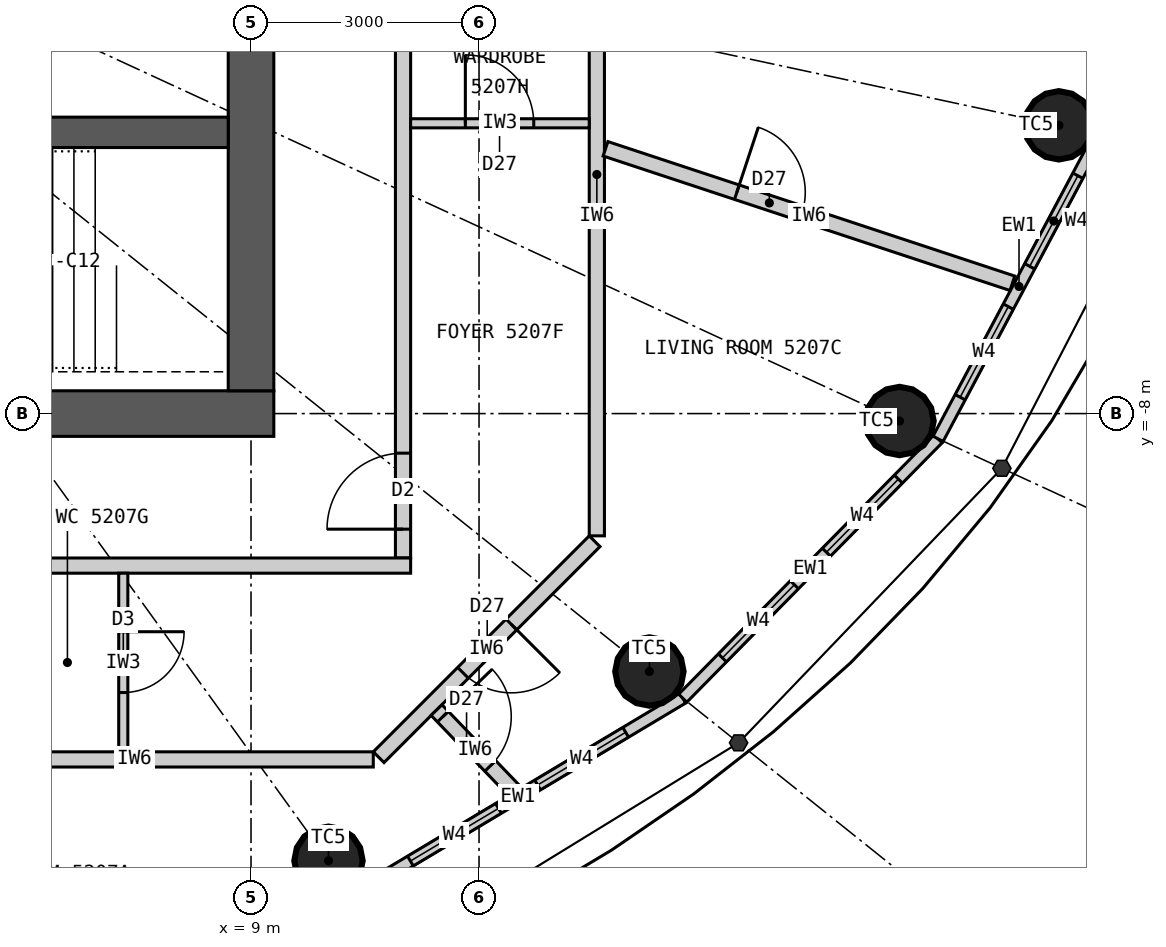
"""IFC4 building model, lengths in metres.
Left out: names, types, materials, properties, quantities, classifications, styles, units other than length and angle.
Written with IfcOpenShell. Run it as: python <this file> out.ifc"""

import sys

from ifc_helpers import new_model, si_unit, direction, frame, frame_2d, origin, origin_2d, place, context, subcontext, project, spatial, rectangle, circle, extrude, element, fill, save


model = new_model("IFC4")
c1 = context("Model", 3, precision=1e-05, world=origin(), true_north=direction((0.0, 1.0)))
c2 = subcontext(c1, "Body", "Model", "MODEL_VIEW")
j1 = project(units=[si_unit("LENGTHUNIT", "METRE"), si_unit("PLANEANGLEUNIT", "RADIAN")], contexts=[c1])
p1 = place(None, origin())
s1 = spatial("IfcSite", under=j1, at=p1, CompositionType="ELEMENT")
p2 = place(p1, origin())
s2 = spatial("IfcBuilding", under=s1, at=p2, CompositionType="ELEMENT")
p3 = place(p2, frame((0.0, 0.0, 196.2)))
s3 = spatial("IfcBuildingStorey", under=s2, at=p3, CompositionType="ELEMENT", Elevation=196.2)
for number, where, z_axis, x_axis in (
    (1, (10.019, -13.883, 0.0), (0.0, 0.0, 1.0), (1.0, 0.0, 0.0)),
    (2, (14.241, -11.393, 0.0), (0.0, 0.0, 1.0), (1.0, 0.0, 0.0)),
    (3, (17.532, -8.098, 0.0), (0.0, 0.0, 1.0), (1.0, 0.0, 0.0)),
    (4, (19.629, -4.208, 0.0), (0.0, 0.0, 1.0), (1.0, 0.0, 0.0)),
):
    element("IfcColumn", number, at=place(p3, frame(where, z_axis=z_axis, x_axis=x_axis)), inside=s3, PredefinedType="COLUMN", context=c2, shape_type="SweptSolid", body=[
        extrude(circle(Radius=0.45, at=origin_2d()), origin(), (0.0, 0.0, 1.0), 3.3),
    ])
p4 = place(p3, frame((9.3, -8.0, 0.0), z_axis=(0.0, 0.0, 1.0), x_axis=(-1.0, 0.0, 0.0)))
e5 = element("IfcWall", 5, at=p4, inside=s3, PredefinedType="SHEAR", context=c2, shape_type="SweptSolid", body=[
    extrude(rectangle(XDim=18.6, YDim=0.6, at=frame_2d((9.3, 0.0))), origin(), (0.0, 0.0, 1.0), 3.3),
])
p5 = place(p4, frame((8.0, 0.0, 0.0)))
e6 = element("IfcOpeningElement", 6, at=p5, cuts=e5, PredefinedType="OPENING", context=c2, shape_type="SweptSolid", body=[
    extrude(rectangle(XDim=1.2, YDim=2.2, at=frame_2d((0.6, 1.1))), frame((0.0, 0.31, 0.0), z_axis=(0.0, -1.0, 0.0), x_axis=(1.0, 0.0, 0.0)), (0.0, 0.0, 1.0), 0.62),
])
p6 = place(p4, frame((15.6, 0.0, 0.0)))
e7 = element("IfcOpeningElement", 7, at=p6, cuts=e5, PredefinedType="OPENING", context=c2, shape_type="SweptSolid", body=[
    extrude(rectangle(XDim=0.9, YDim=2.2, at=frame_2d((0.45, 1.1))), frame((0.0, 0.31, 0.0), z_axis=(0.0, -1.0, 0.0), x_axis=(1.0, 0.0, 0.0)), (0.0, 0.0, 1.0), 0.62),
])
p7 = place(p3, frame((9.0, -7.7, 0.0), z_axis=(0.0, 0.0, 1.0), x_axis=(0.0, 1.0, 0.0)))
e8 = element("IfcWall", 8, at=p7, inside=s3, PredefinedType="SHEAR", context=c2, shape_type="SweptSolid", body=[
    extrude(rectangle(XDim=15.4, YDim=0.6, at=frame_2d((7.7, 0.0))), origin(), (0.0, 0.0, 1.0), 3.3),
])
p8 = place(p7, frame((6.8, 0.0, 0.0)))
e9 = element("IfcOpeningElement", 9, at=p8, cuts=e8, PredefinedType="OPENING", context=c2, shape_type="SweptSolid", body=[
    extrude(rectangle(XDim=1.8, YDim=2.2, at=frame_2d((0.9, 1.1))), frame((0.0, 0.31, 0.0), z_axis=(0.0, -1.0, 0.0), x_axis=(1.0, 0.0, 0.0)), (0.0, 0.0, 1.0), 0.62),
])
p9 = place(p3, frame((-8.7, -4.3, 0.0), z_axis=(0.0, 0.0, 1.0), x_axis=(1.0, 0.0, 0.0)))
e10 = element("IfcWall", 10, at=p9, inside=s3, PredefinedType="SHEAR", context=c2, shape_type="SweptSolid", body=[
    extrude(rectangle(XDim=17.4, YDim=0.4, at=frame_2d((8.7, 0.0))), origin(), (0.0, 0.0, 1.0), 3.3),
])
p10 = place(p3, frame((10.346, -14.336, 0.0), z_axis=(0.0, 0.0, 1.0), x_axis=(0.85822150553, 0.513279502265, 0.0)))
e11 = element("IfcWall", 11, at=p10, inside=s3, PredefinedType="ELEMENTEDWALL", context=c2, shape_type="SweptSolid", body=[
    extrude(rectangle(XDim=5.05, YDim=0.15, at=frame_2d((2.525, 0.0))), origin(), (0.0, 0.0, 1.0), 3.12),
])
p11 = place(p10, frame((0.875, 0.0, 0.9)))
e12 = element("IfcOpeningElement", 12, at=p11, cuts=e11, PredefinedType="OPENING", context=c2, shape_type="SweptSolid", body=[
    extrude(rectangle(XDim=1.35, YDim=1.9, at=frame_2d((0.675, 0.95))), frame((0.0, 0.085, 0.0), z_axis=(0.0, -1.0, 0.0), x_axis=(1.0, 0.0, 0.0)), (0.0, 0.0, 1.0), 0.17),
])
p12 = place(p10, frame((2.825, 0.0, 0.9)))
e13 = element("IfcOpeningElement", 13, at=p12, cuts=e11, PredefinedType="OPENING", context=c2, shape_type="SweptSolid", body=[
    extrude(rectangle(XDim=1.35, YDim=1.9, at=frame_2d((0.675, 0.95))), frame((0.0, 0.085, 0.0), z_axis=(0.0, -1.0, 0.0), x_axis=(1.0, 0.0, 0.0)), (0.0, 0.0, 1.0), 0.17),
])
p13 = place(p3, frame((14.68, -11.744, 0.0), z_axis=(0.0, 0.0, 1.0), x_axis=(0.701527379618, 0.712642501993, 0.0)))
e14 = element("IfcWall", 14, at=p13, inside=s3, PredefinedType="ELEMENTEDWALL", context=c2, shape_type="SweptSolid", body=[
    extrude(rectangle(XDim=4.788, YDim=0.15, at=frame_2d((2.394, 0.0))), origin(), (0.0, 0.0, 1.0), 3.12),
])
p14 = place(p13, frame((0.744, 0.0, 0.9)))
e15 = element("IfcOpeningElement", 15, at=p14, cuts=e14, PredefinedType="OPENING", context=c2, shape_type="SweptSolid", body=[
    extrude(rectangle(XDim=1.35, YDim=1.9, at=frame_2d((0.675, 0.95))), frame((0.0, 0.085, 0.0), z_axis=(0.0, -1.0, 0.0), x_axis=(1.0, 0.0, 0.0)), (0.0, 0.0, 1.0), 0.17),
])
p15 = place(p13, frame((2.694, 0.0, 0.9)))
e16 = element("IfcOpeningElement", 16, at=p15, cuts=e14, PredefinedType="OPENING", context=c2, shape_type="SweptSolid", body=[
    extrude(rectangle(XDim=1.35, YDim=1.9, at=frame_2d((0.675, 0.95))), frame((0.0, 0.085, 0.0), z_axis=(0.0, -1.0, 0.0), x_axis=(1.0, 0.0, 0.0)), (0.0, 0.0, 1.0), 0.17),
])
p16 = place(p3, frame((18.04, -8.332, 0.0), z_axis=(0.0, 0.0, 1.0), x_axis=(0.469256152955, 0.883062094597, 0.0)))
e17 = element("IfcWall", 17, at=p16, inside=s3, PredefinedType="ELEMENTEDWALL", context=c2, shape_type="SweptSolid", body=[
    extrude(rectangle(XDim=4.539, YDim=0.15, at=frame_2d((2.27, 0.0))), origin(), (0.0, 0.0, 1.0), 3.12),
])
p17 = place(p16, frame((0.62, 0.0, 0.9)))
e18 = element("IfcOpeningElement", 18, at=p17, cuts=e17, PredefinedType="OPENING", context=c2, shape_type="SweptSolid", body=[
    extrude(rectangle(XDim=1.35, YDim=1.9, at=frame_2d((0.675, 0.95))), frame((0.0, 0.085, 0.0), z_axis=(0.0, -1.0, 0.0), x_axis=(1.0, 0.0, 0.0)), (0.0, 0.0, 1.0), 0.17),
])
p18 = place(p16, frame((2.57, 0.0, 0.9)))
e19 = element("IfcOpeningElement", 19, at=p18, cuts=e17, PredefinedType="OPENING", context=c2, shape_type="SweptSolid", body=[
    extrude(rectangle(XDim=1.35, YDim=1.9, at=frame_2d((0.675, 0.95))), frame((0.0, 0.085, 0.0), z_axis=(0.0, -1.0, 0.0), x_axis=(1.0, 0.0, 0.0)), (0.0, 0.0, 1.0), 0.17),
])
p19 = place(p3, frame((11.0, -9.9, 0.0), z_axis=(0.0, 0.0, 1.0), x_axis=(0.0, 1.0, 0.0)))
e20 = element("IfcWall", 20, at=p19, inside=s3, PredefinedType="PARTITIONING", context=c2, shape_type="SweptSolid", body=[
    extrude(rectangle(XDim=19.8, YDim=0.2, at=frame_2d((9.9, 0.0))), origin(), (0.0, 0.0, 1.0), 3.12),
])
p20 = place(p19, frame((10.32, 0.0, 0.0)))
e21 = element("IfcOpeningElement", 21, at=p20, cuts=e20, PredefinedType="OPENING", context=c2, shape_type="SweptSolid", body=[
    extrude(rectangle(XDim=1.0, YDim=2.2, at=frame_2d((0.5, 1.1))), frame((0.0, 0.11, 0.0), z_axis=(0.0, -1.0, 0.0), x_axis=(1.0, 0.0, 0.0)), (0.0, 0.0, 1.0), 0.22),
])
p21 = place(p19, frame((18.653, 0.0, 0.0)))
e22 = element("IfcOpeningElement", 22, at=p21, cuts=e20, PredefinedType="OPENING", context=c2, shape_type="SweptSolid", body=[
    extrude(rectangle(XDim=1.0, YDim=2.2, at=frame_2d((0.5, 1.1))), frame((0.0, 0.11, 0.0), z_axis=(0.0, -1.0, 0.0), x_axis=(1.0, 0.0, 0.0)), (0.0, 0.0, 1.0), 0.22),
])
p22 = place(p19, frame((0.379, 0.0, 0.0)))
e23 = element("IfcOpeningElement", 23, at=p22, cuts=e20, PredefinedType="OPENING", context=c2, shape_type="SweptSolid", body=[
    extrude(rectangle(XDim=1.0, YDim=2.2, at=frame_2d((0.5, 1.1))), frame((0.0, 0.11, 0.0), z_axis=(0.0, -1.0, 0.0), x_axis=(1.0, 0.0, 0.0)), (0.0, 0.0, 1.0), 0.22),
])
p23 = place(p3, frame((11.1, -10.0, 0.0), z_axis=(0.0, 0.0, 1.0), x_axis=(-1.0, 0.0, 0.0)))
e24 = element("IfcWall", 24, at=p23, inside=s3, PredefinedType="PARTITIONING", context=c2, shape_type="SweptSolid", body=[
    extrude(rectangle(XDim=12.559, YDim=0.2, at=frame_2d((6.28, 0.0))), origin(), (0.0, 0.0, 1.0), 3.12),
])
p24 = place(p3, frame((4.325, -12.55, 0.0), z_axis=(0.0, 0.0, 1.0), x_axis=(1.0, 0.0, 0.0)))
e25 = element("IfcWall", 25, at=p24, inside=s3, PredefinedType="PARTITIONING", context=c2, shape_type="SweptSolid", body=[
    extrude(rectangle(XDim=6.284, YDim=0.2, at=frame_2d((3.142, 0.0))), origin(), (0.0, 0.0, 1.0), 3.12),
])
p25 = place(p24, frame((0.564, 0.0, 0.0)))
e26 = element("IfcOpeningElement", 26, at=p25, cuts=e25, PredefinedType="OPENING", context=c2, shape_type="SweptSolid", body=[
    extrude(rectangle(XDim=0.8, YDim=2.1, at=frame_2d((0.4, 1.05))), frame((0.0, 0.11, 0.0), z_axis=(0.0, -1.0, 0.0), x_axis=(1.0, 0.0, 0.0)), (0.0, 0.0, 1.0), 0.22),
])
p26 = place(p3, frame((10.679, -12.521, 0.0), z_axis=(0.0, 0.0, 1.0), x_axis=(0.707106781187, 0.707106781187, 0.0)))
e27 = element("IfcWall", 27, at=p26, inside=s3, PredefinedType="PARTITIONING", context=c2, shape_type="SweptSolid", body=[
    extrude(rectangle(XDim=4.019, YDim=0.2, at=frame_2d((2.009, 0.0))), origin(), (0.0, 0.0, 1.0), 3.12),
])
p27 = place(p26, frame((1.57, 0.0, 0.0)))
e28 = element("IfcOpeningElement", 28, at=p27, cuts=e27, PredefinedType="OPENING", context=c2, shape_type="SweptSolid", body=[
    extrude(rectangle(XDim=0.9, YDim=2.1, at=frame_2d((0.45, 1.05))), frame((0.0, 0.11, 0.0), z_axis=(0.0, -1.0, 0.0), x_axis=(1.0, 0.0, 0.0)), (0.0, 0.0, 1.0), 0.22),
])
p28 = place(p3, frame((13.55, -9.609, 0.0), z_axis=(0.0, 0.0, 1.0), x_axis=(0.0, 1.0, 0.0)))
e29 = element("IfcWall", 29, at=p28, inside=s3, PredefinedType="PARTITIONING", context=c2, shape_type="SweptSolid", body=[
    extrude(rectangle(XDim=9.508, YDim=0.2, at=frame_2d((4.754, 0.0))), origin(), (0.0, 0.0, 1.0), 3.12),
])
p29 = place(p28, frame((7.308, 0.0, 0.0)))
e30 = element("IfcOpeningElement", 30, at=p29, cuts=e29, PredefinedType="OPENING", context=c2, shape_type="SweptSolid", body=[
    extrude(rectangle(XDim=0.8, YDim=2.1, at=frame_2d((0.4, 1.05))), frame((0.0, 0.11, 0.0), z_axis=(0.0, -1.0, 0.0), x_axis=(1.0, 0.0, 0.0)), (0.0, 0.0, 1.0), 0.22),
])
p30 = place(p3, frame((11.441, -11.9, 0.0), z_axis=(0.0, 0.0, 1.0), x_axis=(0.692958717259, -0.720977264672, 0.0)))
e31 = element("IfcWall", 31, at=p30, inside=s3, PredefinedType="PARTITIONING", context=c2, shape_type="SweptSolid", body=[
    extrude(rectangle(XDim=1.464, YDim=0.2, at=frame_2d((0.732, 0.0))), origin(), (0.0, 0.0, 1.0), 3.12),
])
p31 = place(p30, frame((0.12, 0.0, 0.0)))
e32 = element("IfcOpeningElement", 32, at=p31, cuts=e31, PredefinedType="OPENING", context=c2, shape_type="SweptSolid", body=[
    extrude(rectangle(XDim=0.9, YDim=2.1, at=frame_2d((0.45, 1.05))), frame((0.0, 0.11, 0.0), z_axis=(0.0, -1.0, 0.0), x_axis=(1.0, 0.0, 0.0)), (0.0, 0.0, 1.0), 0.22),
])
p32 = place(p3, frame((13.664, -4.516, 0.0), z_axis=(0.0, 0.0, 1.0), x_axis=(0.949481375941, -0.313823384632, 0.0)))
e33 = element("IfcWall", 33, at=p32, inside=s3, PredefinedType="PARTITIONING", context=c2, shape_type="SweptSolid", body=[
    extrude(rectangle(XDim=5.638, YDim=0.2, at=frame_2d((2.819, 0.0))), origin(), (0.0, 0.0, 1.0), 3.12),
])
p33 = place(p32, frame((1.82, 0.0, 0.0)))
e34 = element("IfcOpeningElement", 34, at=p33, cuts=e33, PredefinedType="OPENING", context=c2, shape_type="SweptSolid", body=[
    extrude(rectangle(XDim=0.9, YDim=2.1, at=frame_2d((0.45, 1.05))), frame((0.0, 0.11, 0.0), z_axis=(0.0, -1.0, 0.0), x_axis=(1.0, 0.0, 0.0)), (0.0, 0.0, 1.0), 0.22),
])
p34 = place(p3, frame((7.319, -10.1, 0.0), z_axis=(0.0, 0.0, 1.0), x_axis=(0.0, -1.0, 0.0)))
e35 = element("IfcWall", 35, at=p34, inside=s3, PredefinedType="PARTITIONING", context=c2, shape_type="SweptSolid", body=[
    extrude(rectangle(XDim=2.35, YDim=0.12, at=frame_2d((1.175, 0.0))), origin(), (0.0, 0.0, 1.0), 3.12),
])
p35 = place(p34, frame((0.77, 0.0, 0.0)))
e36 = element("IfcOpeningElement", 36, at=p35, cuts=e35, PredefinedType="OPENING", context=c2, shape_type="SweptSolid", body=[
    extrude(rectangle(XDim=0.8, YDim=2.1, at=frame_2d((0.4, 1.05))), frame((0.0, 0.07, 0.0), z_axis=(0.0, -1.0, 0.0), x_axis=(1.0, 0.0, 0.0)), (0.0, 0.0, 1.0), 0.14),
])
p36 = place(p3, frame((11.1, -4.181, 0.0), z_axis=(0.0, 0.0, 1.0), x_axis=(1.0, 0.0, 0.0)))
e37 = element("IfcWall", 37, at=p36, inside=s3, PredefinedType="PARTITIONING", context=c2, shape_type="SweptSolid", body=[
    extrude(rectangle(XDim=2.35, YDim=0.12, at=frame_2d((1.175, 0.0))), origin(), (0.0, 0.0, 1.0), 3.12),
])
p37 = place(p36, frame((0.72, 0.0, 0.0)))
e38 = element("IfcOpeningElement", 38, at=p37, cuts=e37, PredefinedType="OPENING", context=c2, shape_type="SweptSolid", body=[
    extrude(rectangle(XDim=0.9, YDim=2.1, at=frame_2d((0.45, 1.05))), frame((0.0, 0.07, 0.0), z_axis=(0.0, -1.0, 0.0), x_axis=(1.0, 0.0, 0.0)), (0.0, 0.0, 1.0), 0.14),
])
p38 = place(p11, origin())
e39 = element("IfcWindow", 39, at=p38, inside=s3, PartitioningType="SINGLE_PANEL", PredefinedType="WINDOW", context=c2, shape_type="SweptSolid", body=[
    extrude(rectangle(XDim=1.35, YDim=1.9, at=frame_2d((0.675, 0.95))), frame((0.0, 0.03, 0.0), z_axis=(0.0, -1.0, 0.0), x_axis=(1.0, 0.0, 0.0)), (0.0, 0.0, 1.0), 0.06),
])
fill(e12, e39)
p39 = place(p12, origin())
e40 = element("IfcWindow", 40, at=p39, inside=s3, PartitioningType="SINGLE_PANEL", PredefinedType="WINDOW", context=c2, shape_type="SweptSolid", body=[
    extrude(rectangle(XDim=1.35, YDim=1.9, at=frame_2d((0.675, 0.95))), frame((0.0, 0.03, 0.0), z_axis=(0.0, -1.0, 0.0), x_axis=(1.0, 0.0, 0.0)), (0.0, 0.0, 1.0), 0.06),
])
fill(e13, e40)
p40 = place(p14, origin())
e41 = element("IfcWindow", 41, at=p40, inside=s3, PartitioningType="SINGLE_PANEL", PredefinedType="WINDOW", context=c2, shape_type="SweptSolid", body=[
    extrude(rectangle(XDim=1.35, YDim=1.9, at=frame_2d((0.675, 0.95))), frame((0.0, 0.03, 0.0), z_axis=(0.0, -1.0, 0.0), x_axis=(1.0, 0.0, 0.0)), (0.0, 0.0, 1.0), 0.06),
])
fill(e15, e41)
p41 = place(p15, origin())
e42 = element("IfcWindow", 42, at=p41, inside=s3, PartitioningType="SINGLE_PANEL", PredefinedType="WINDOW", context=c2, shape_type="SweptSolid", body=[
    extrude(rectangle(XDim=1.35, YDim=1.9, at=frame_2d((0.675, 0.95))), frame((0.0, 0.03, 0.0), z_axis=(0.0, -1.0, 0.0), x_axis=(1.0, 0.0, 0.0)), (0.0, 0.0, 1.0), 0.06),
])
fill(e16, e42)
p42 = place(p17, origin())
e43 = element("IfcWindow", 43, at=p42, inside=s3, PartitioningType="SINGLE_PANEL", PredefinedType="WINDOW", context=c2, shape_type="SweptSolid", body=[
    extrude(rectangle(XDim=1.35, YDim=1.9, at=frame_2d((0.675, 0.95))), frame((0.0, 0.03, 0.0), z_axis=(0.0, -1.0, 0.0), x_axis=(1.0, 0.0, 0.0)), (0.0, 0.0, 1.0), 0.06),
])
fill(e18, e43)
p43 = place(p18, origin())
e44 = element("IfcWindow", 44, at=p43, inside=s3, PartitioningType="SINGLE_PANEL", PredefinedType="WINDOW", context=c2, shape_type="SweptSolid", body=[
    extrude(rectangle(XDim=1.35, YDim=1.9, at=frame_2d((0.675, 0.95))), frame((0.0, 0.03, 0.0), z_axis=(0.0, -1.0, 0.0), x_axis=(1.0, 0.0, 0.0)), (0.0, 0.0, 1.0), 0.06),
])
fill(e19, e44)
p44 = place(p22, origin())
e45 = element("IfcDoor", 45, at=p44, inside=s3, OperationType="SINGLE_SWING_LEFT", PredefinedType="DOOR", context=c2, shape_type="SweptSolid", body=[
    extrude(rectangle(XDim=1.0, YDim=2.2, at=frame_2d((0.5, 1.1))), frame((0.0, 0.025, 0.0), z_axis=(0.0, -1.0, 0.0), x_axis=(1.0, 0.0, 0.0)), (0.0, 0.0, 1.0), 0.05),
])
fill(e23, e45)
p45 = place(p35, origin())
e46 = element("IfcDoor", 46, at=p45, inside=s3, OperationType="SINGLE_SWING_LEFT", PredefinedType="DOOR", context=c2, shape_type="SweptSolid", body=[
    extrude(rectangle(XDim=0.8, YDim=2.1, at=frame_2d((0.4, 1.05))), frame((0.0, 0.025, 0.0), z_axis=(0.0, -1.0, 0.0), x_axis=(1.0, 0.0, 0.0)), (0.0, 0.0, 1.0), 0.05),
])
fill(e36, e46)
p46 = place(p37, origin())
e47 = element("IfcDoor", 47, at=p46, inside=s3, OperationType="SINGLE_SWING_LEFT", PredefinedType="DOOR", context=c2, shape_type="SweptSolid", body=[
    extrude(rectangle(XDim=0.9, YDim=2.1, at=frame_2d((0.45, 1.05))), frame((0.0, 0.025, 0.0), z_axis=(0.0, -1.0, 0.0), x_axis=(1.0, 0.0, 0.0)), (0.0, 0.0, 1.0), 0.05),
])
fill(e38, e47)
p47 = place(p27, origin())
e48 = element("IfcDoor", 48, at=p47, inside=s3, OperationType="SINGLE_SWING_RIGHT", PredefinedType="DOOR", context=c2, shape_type="SweptSolid", body=[
    extrude(rectangle(XDim=0.9, YDim=2.1, at=frame_2d((0.45, 1.05))), frame((0.0, 0.025, 0.0), z_axis=(0.0, -1.0, 0.0), x_axis=(1.0, 0.0, 0.0)), (0.0, 0.0, 1.0), 0.05),
])
fill(e28, e48)
p48 = place(p31, origin())
e49 = element("IfcDoor", 49, at=p48, inside=s3, OperationType="SINGLE_SWING_LEFT", PredefinedType="DOOR", context=c2, shape_type="SweptSolid", body=[
    extrude(rectangle(XDim=0.9, YDim=2.1, at=frame_2d((0.45, 1.05))), frame((0.0, 0.025, 0.0), z_axis=(0.0, -1.0, 0.0), x_axis=(1.0, 0.0, 0.0)), (0.0, 0.0, 1.0), 0.05),
])
fill(e32, e49)
p49 = place(p33, origin())
e50 = element("IfcDoor", 50, at=p49, inside=s3, OperationType="SINGLE_SWING_LEFT", PredefinedType="DOOR", context=c2, shape_type="SweptSolid", body=[
    extrude(rectangle(XDim=0.9, YDim=2.1, at=frame_2d((0.45, 1.05))), frame((0.0, 0.025, 0.0), z_axis=(0.0, -1.0, 0.0), x_axis=(1.0, 0.0, 0.0)), (0.0, 0.0, 1.0), 0.05),
])
fill(e34, e50)
save(model, sys.argv[1])
